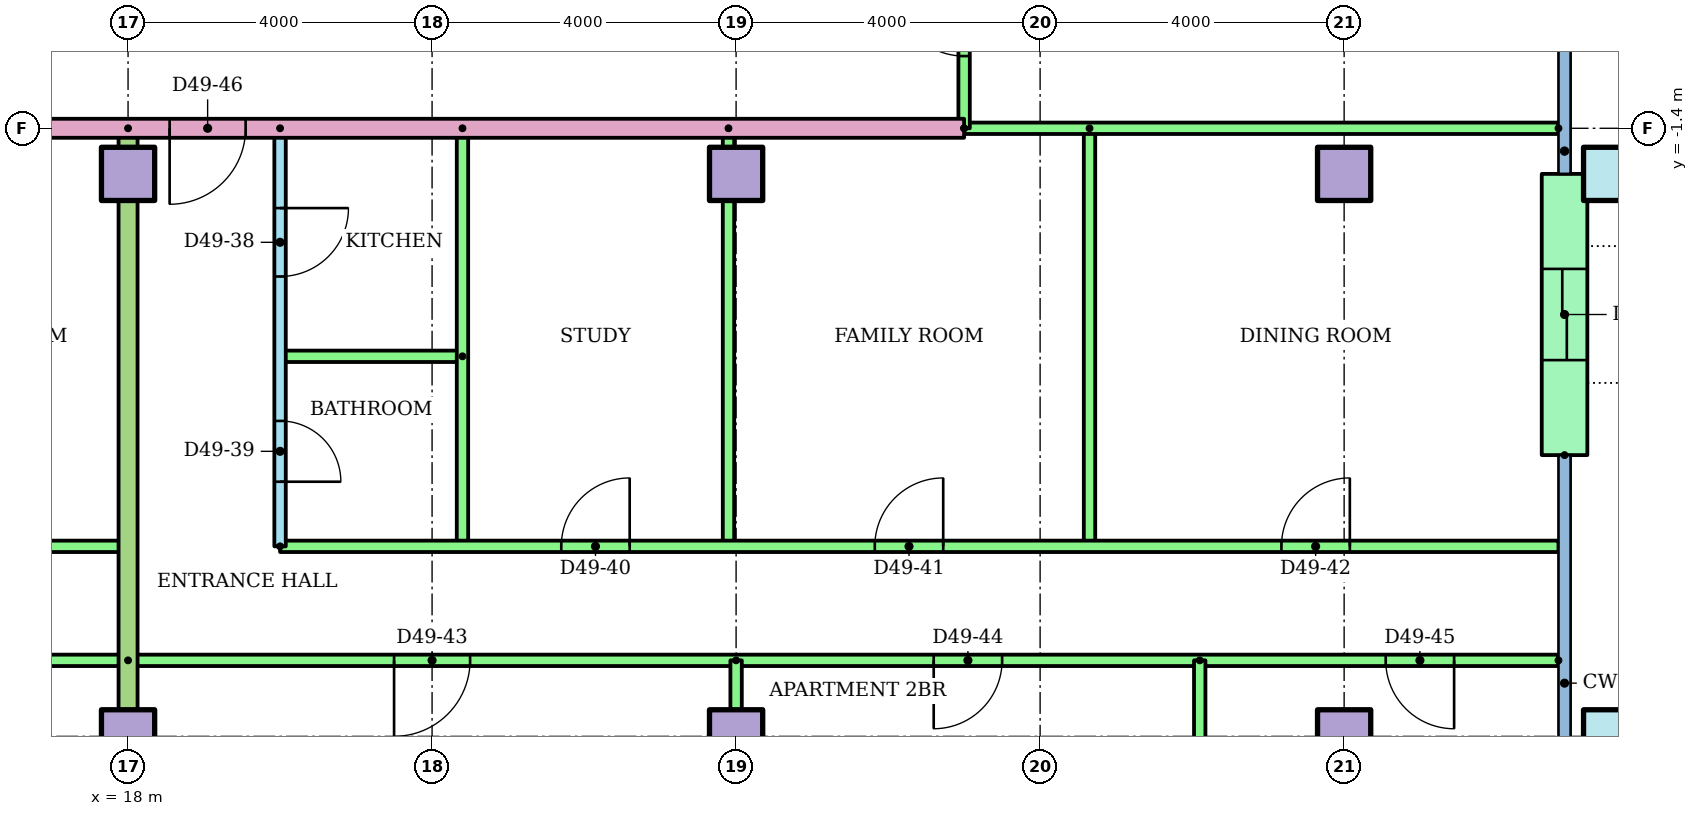
"""IFC4 building model, lengths in metres.
Left out: names, types, materials, properties, quantities, classifications, styles, units other than length and angle.
Written with IfcOpenShell. Run it as: python <this file> out.ifc"""

import sys

from ifc_helpers import new_model, si_unit, direction, frame, frame_2d, origin, origin_2d, place, context, subcontext, project, spatial, rectangle, hollow_rectangle, extrude, element, fill, save


model = new_model("IFC4")
c1 = context("Model", 3, precision=1e-05, world=origin(), true_north=direction((0.0, 1.0)))
c2 = subcontext(c1, "Body", "Model", "MODEL_VIEW")
j1 = project(units=[si_unit("LENGTHUNIT", "METRE"), si_unit("PLANEANGLEUNIT", "RADIAN")], contexts=[c1])
p1 = place(None, origin())
s1 = spatial("IfcSite", under=j1, at=p1, CompositionType="ELEMENT")
p2 = place(p1, origin())
s2 = spatial("IfcBuilding", under=s1, at=p2, CompositionType="ELEMENT")
p3 = place(p2, frame((0.0, 0.0, 187.7)))
s3 = spatial("IfcBuildingStorey", under=s2, at=p3, CompositionType="ELEMENT", Elevation=187.7)
for number, where in (
    (1, (18.0, -9.4, 0.0)),
    (2, (26.0, -9.4, 0.0)),
    (3, (34.0, -9.4, 0.0)),
):
    element("IfcColumn", number, at=place(p3, frame(where)), inside=s3, PredefinedType="COLUMN", context=c2, shape_type="SweptSolid", body=[
        extrude(rectangle(XDim=0.7, YDim=0.7, at=origin_2d()), origin(), (0.0, 0.0, 1.0), 3.2),
    ])
p4 = place(p3, frame((37.5, -9.4, 0.0)))
e4 = element("IfcColumn", 4, at=p4, inside=s3, PredefinedType="COLUMN", context=c2, shape_type="SweptSolid", body=[
    extrude(hollow_rectangle(XDim=0.7, YDim=0.7, WallThickness=0.036, at=origin_2d()), origin(), (0.0, 0.0, 1.0), 3.2),
])
for number, where in (
    (5, (18.0, -2.0, 0.0)),
    (6, (26.0, -2.0, 0.0)),
    (7, (34.0, -2.0, 0.0)),
):
    element("IfcColumn", number, at=place(p3, frame(where)), inside=s3, PredefinedType="COLUMN", context=c2, shape_type="SweptSolid", body=[
        extrude(rectangle(XDim=0.7, YDim=0.7, at=origin_2d()), origin(), (0.0, 0.0, 1.0), 3.2),
    ])
p5 = place(p3, frame((37.5, -2.0, 0.0)))
e8 = element("IfcColumn", 8, at=p5, inside=s3, PredefinedType="COLUMN", context=c2, shape_type="SweptSolid", body=[
    extrude(hollow_rectangle(XDim=0.7, YDim=0.7, WallThickness=0.036, at=origin_2d()), origin(), (0.0, 0.0, 1.0), 3.2),
])
p6 = place(p3, frame((36.9, -5.7, 0.0), z_axis=(0.0, 0.0, 1.0), x_axis=(0.0, 1.0, 0.0)))
e9 = element("IfcWall", 9, at=p6, inside=s3, PredefinedType="STANDARD", context=c2, shape_type="SweptSolid", body=[
    extrude(rectangle(XDim=3.7, YDim=0.6, at=frame_2d((1.85, 0.0))), origin(), (0.0, 0.0, 1.0), 2.92),
])
p7 = place(p6, frame((1.25, 0.0, 0.0)))
e10 = element("IfcOpeningElement", 10, at=p7, cuts=e9, PredefinedType="OPENING", context=c2, shape_type="SweptSolid", body=[
    extrude(rectangle(XDim=1.2, YDim=2.1, at=frame_2d((0.6, 1.05))), frame((0.0, 0.31, 0.0), z_axis=(0.0, -1.0, 0.0), x_axis=(1.0, 0.0, 0.0)), (0.0, 0.0, 1.0), 0.62),
])
p8 = place(p3, frame((12.0, -6.9, 0.0)))
e11 = element("IfcWall", 11, at=p8, inside=s3, PredefinedType="PARTITIONING", context=c2, shape_type="SweptSolid", body=[
    extrude(rectangle(XDim=6.0, YDim=0.15, at=frame_2d((3.0, 0.0))), origin(), (0.0, 0.0, 1.0), 2.4),
])
p9 = place(p8, frame((3.75, 0.0, 0.0)))
e12 = element("IfcOpeningElement", 12, at=p9, cuts=e11, PredefinedType="OPENING", context=c2, shape_type="SweptSolid", body=[
    extrude(rectangle(XDim=0.9, YDim=2.1, at=frame_2d((0.45, 1.05))), frame((0.0, 0.085, 0.0), z_axis=(0.0, -1.0, 0.0), x_axis=(1.0, 0.0, 0.0)), (0.0, 0.0, 1.0), 0.17),
])
p10 = place(p3, frame((18.0, -8.4, 0.0), z_axis=(0.0, 0.0, 1.0), x_axis=(-1.0, 0.0, 0.0)))
e13 = element("IfcWall", 13, at=p10, inside=s3, PredefinedType="PARTITIONING", context=c2, shape_type="SweptSolid", body=[
    extrude(rectangle(XDim=8.0, YDim=0.15, at=frame_2d((4.0, 0.0))), origin(), (0.0, 0.0, 1.0), 2.4),
])
p11 = place(p10, frame((5.5, 0.0, 0.0)))
e14 = element("IfcOpeningElement", 14, at=p11, cuts=e13, PredefinedType="OPENING", context=c2, shape_type="SweptSolid", body=[
    extrude(rectangle(XDim=1.0, YDim=2.1, at=frame_2d((0.5, 1.05))), frame((0.0, 0.085, 0.0), z_axis=(0.0, -1.0, 0.0), x_axis=(1.0, 0.0, 0.0)), (0.0, 0.0, 1.0), 0.17),
])
p12 = place(p10, frame((1.5, 0.0, 0.0)))
e15 = element("IfcOpeningElement", 15, at=p12, cuts=e13, PredefinedType="OPENING", context=c2, shape_type="SweptSolid", body=[
    extrude(rectangle(XDim=1.0, YDim=2.1, at=frame_2d((0.5, 1.05))), frame((0.0, 0.085, 0.0), z_axis=(0.0, -1.0, 0.0), x_axis=(1.0, 0.0, 0.0)), (0.0, 0.0, 1.0), 0.17),
])
p13 = place(p3, frame((20.0, -1.4, 0.0), z_axis=(0.0, 0.0, 1.0), x_axis=(0.0, -1.0, 0.0)))
e16 = element("IfcWall", 16, at=p13, inside=s3, PredefinedType="PARTITIONING", context=c2, shape_type="SweptSolid", body=[
    extrude(rectangle(XDim=5.5, YDim=0.15, at=frame_2d((2.75, 0.0))), origin(), (0.0, 0.0, 1.0), 2.4),
])
p14 = place(p13, frame((1.05, 0.0, 0.0)))
e17 = element("IfcOpeningElement", 17, at=p14, cuts=e16, PredefinedType="OPENING", context=c2, shape_type="SweptSolid", body=[
    extrude(rectangle(XDim=0.9, YDim=2.1, at=frame_2d((0.45, 1.05))), frame((0.0, 0.085, 0.0), z_axis=(0.0, -1.0, 0.0), x_axis=(1.0, 0.0, 0.0)), (0.0, 0.0, 1.0), 0.17),
])
p15 = place(p13, frame((3.85, 0.0, 0.0)))
e18 = element("IfcOpeningElement", 18, at=p15, cuts=e16, PredefinedType="OPENING", context=c2, shape_type="SweptSolid", body=[
    extrude(rectangle(XDim=0.8, YDim=2.1, at=frame_2d((0.4, 1.05))), frame((0.0, 0.085, 0.0), z_axis=(0.0, -1.0, 0.0), x_axis=(1.0, 0.0, 0.0)), (0.0, 0.0, 1.0), 0.17),
])
p16 = place(p3, frame((22.4, -4.4, 0.0), z_axis=(0.0, 0.0, 1.0), x_axis=(-1.0, 0.0, 0.0)))
e19 = element("IfcWall", 19, at=p16, inside=s3, PredefinedType="PARTITIONING", context=c2, shape_type="SweptSolid", body=[
    extrude(rectangle(XDim=2.4, YDim=0.15, at=frame_2d((1.2, 0.0))), origin(), (0.0, 0.0, 1.0), 2.4),
])
for number, where, z_axis, x_axis in (
    (20, (22.4, -1.4, 0.0), (0.0, 0.0, 1.0), (0.0, -1.0, 0.0)),
    (21, (25.9, -1.4, 0.0), (0.0, 0.0, 1.0), (0.0, -1.0, 0.0)),
    (22, (30.65, -1.4, 0.0), (0.0, 0.0, 1.0), (0.0, -1.0, 0.0)),
):
    element("IfcWall", number, at=place(p3, frame(where, z_axis=z_axis, x_axis=x_axis)), inside=s3, PredefinedType="PARTITIONING", context=c2, shape_type="SweptSolid", body=[
        extrude(rectangle(XDim=5.5, YDim=0.15, at=frame_2d((2.75, 0.0))), origin(), (0.0, 0.0, 1.0), 2.4),
    ])
p17 = place(p3, frame((20.0, -6.9, 0.0)))
e23 = element("IfcWall", 23, at=p17, inside=s3, PredefinedType="PARTITIONING", context=c2, shape_type="SweptSolid", body=[
    extrude(rectangle(XDim=16.82, YDim=0.15, at=frame_2d((8.41, 0.0))), origin(), (0.0, 0.0, 1.0), 2.4),
])
p18 = place(p17, frame((3.7, 0.0, 0.0)))
e24 = element("IfcOpeningElement", 24, at=p18, cuts=e23, PredefinedType="OPENING", context=c2, shape_type="SweptSolid", body=[
    extrude(rectangle(XDim=0.9, YDim=2.1, at=frame_2d((0.45, 1.05))), frame((0.0, 0.085, 0.0), z_axis=(0.0, -1.0, 0.0), x_axis=(1.0, 0.0, 0.0)), (0.0, 0.0, 1.0), 0.17),
])
p19 = place(p17, frame((7.825, 0.0, 0.0)))
e25 = element("IfcOpeningElement", 25, at=p19, cuts=e23, PredefinedType="OPENING", context=c2, shape_type="SweptSolid", body=[
    extrude(rectangle(XDim=0.9, YDim=2.1, at=frame_2d((0.45, 1.05))), frame((0.0, 0.085, 0.0), z_axis=(0.0, -1.0, 0.0), x_axis=(1.0, 0.0, 0.0)), (0.0, 0.0, 1.0), 0.17),
])
p20 = place(p17, frame((13.175, 0.0, 0.0)))
e26 = element("IfcOpeningElement", 26, at=p20, cuts=e23, PredefinedType="OPENING", context=c2, shape_type="SweptSolid", body=[
    extrude(rectangle(XDim=0.9, YDim=2.1, at=frame_2d((0.45, 1.05))), frame((0.0, 0.085, 0.0), z_axis=(0.0, -1.0, 0.0), x_axis=(1.0, 0.0, 0.0)), (0.0, 0.0, 1.0), 0.17),
])
p21 = place(p3, frame((36.82, -8.4, 0.0), z_axis=(0.0, 0.0, 1.0), x_axis=(-1.0, 0.0, 0.0)))
e27 = element("IfcWall", 27, at=p21, inside=s3, PredefinedType="PARTITIONING", context=c2, shape_type="SweptSolid", body=[
    extrude(rectangle(XDim=18.82, YDim=0.15, at=frame_2d((9.41, 0.0))), origin(), (0.0, 0.0, 1.0), 2.4),
])
p22 = place(p21, frame((14.32, 0.0, 0.0)))
e28 = element("IfcOpeningElement", 28, at=p22, cuts=e27, PredefinedType="OPENING", context=c2, shape_type="SweptSolid", body=[
    extrude(rectangle(XDim=1.0, YDim=2.1, at=frame_2d((0.5, 1.05))), frame((0.0, 0.085, 0.0), z_axis=(0.0, -1.0, 0.0), x_axis=(1.0, 0.0, 0.0)), (0.0, 0.0, 1.0), 0.17),
])
p23 = place(p21, frame((7.32, 0.0, 0.0)))
e29 = element("IfcOpeningElement", 29, at=p23, cuts=e27, PredefinedType="OPENING", context=c2, shape_type="SweptSolid", body=[
    extrude(rectangle(XDim=0.9, YDim=2.1, at=frame_2d((0.45, 1.05))), frame((0.0, 0.085, 0.0), z_axis=(0.0, -1.0, 0.0), x_axis=(1.0, 0.0, 0.0)), (0.0, 0.0, 1.0), 0.17),
])
p24 = place(p21, frame((1.373, 0.0, 0.0)))
e30 = element("IfcOpeningElement", 30, at=p24, cuts=e27, PredefinedType="OPENING", context=c2, shape_type="SweptSolid", body=[
    extrude(rectangle(XDim=0.9, YDim=2.1, at=frame_2d((0.45, 1.05))), frame((0.0, 0.085, 0.0), z_axis=(0.0, -1.0, 0.0), x_axis=(1.0, 0.0, 0.0)), (0.0, 0.0, 1.0), 0.17),
])
p25 = place(p3, frame((26.0, -8.4, 0.0), z_axis=(0.0, 0.0, 1.0), x_axis=(0.0, -1.0, 0.0)))
e31 = element("IfcWall", 31, at=p25, inside=s3, PredefinedType="PARTITIONING", context=c2, shape_type="SweptSolid", body=[
    extrude(rectangle(XDim=8.01, YDim=0.15, at=frame_2d((4.005, 0.0))), origin(), (0.0, 0.0, 1.0), 2.4),
])
p26 = place(p3, frame((32.1, -8.4, 0.0), z_axis=(0.0, 0.0, 1.0), x_axis=(0.0, -1.0, 0.0)))
e32 = element("IfcWall", 32, at=p26, inside=s3, PredefinedType="PARTITIONING", context=c2, shape_type="SweptSolid", body=[
    extrude(rectangle(XDim=6.22, YDim=0.15, at=frame_2d((3.11, 0.0))), origin(), (0.0, 0.0, 1.0), 2.4),
])
p27 = place(p3, frame((18.0, -1.4, 0.0), z_axis=(0.0, 0.0, 1.0), x_axis=(0.0, -1.0, 0.0)))
e33 = element("IfcWall", 33, at=p27, inside=s3, PredefinedType="PARTITIONING", context=c2, shape_type="SweptSolid", body=[
    extrude(rectangle(XDim=15.01, YDim=0.25, at=frame_2d((7.505, 0.0))), origin(), (0.0, 0.0, 1.0), 2.4),
])
p28 = place(p3, frame((29.0, -1.4, 0.0), z_axis=(0.0, 0.0, 1.0), x_axis=(-1.0, 0.0, 0.0)))
e34 = element("IfcWall", 34, at=p28, inside=s3, PredefinedType="PARTITIONING", context=c2, shape_type="SweptSolid", body=[
    extrude(rectangle(XDim=15.0, YDim=0.25, at=frame_2d((7.5, 0.0))), origin(), (0.0, 0.0, 1.0), 2.4),
])
p29 = place(p28, frame((9.453, 0.0, 0.0)))
e35 = element("IfcOpeningElement", 35, at=p29, cuts=e34, PredefinedType="OPENING", context=c2, shape_type="SweptSolid", body=[
    extrude(rectangle(XDim=1.0, YDim=2.1, at=frame_2d((0.5, 1.05))), frame((0.0, 0.135, 0.0), z_axis=(0.0, -1.0, 0.0), x_axis=(1.0, 0.0, 0.0)), (0.0, 0.0, 1.0), 0.27),
])
p30 = place(p3, frame((36.82, -1.4, 0.0), z_axis=(0.0, 0.0, 1.0), x_axis=(-1.0, 0.0, 0.0)))
e36 = element("IfcWall", 36, at=p30, inside=s3, PredefinedType="PARTITIONING", context=c2, shape_type="SweptSolid", body=[
    extrude(rectangle(XDim=7.82, YDim=0.15, at=frame_2d((3.91, 0.0))), origin(), (0.0, 0.0, 1.0), 2.4),
])
p31 = place(p3, frame((29.0, -1.4, 0.0), z_axis=(0.0, 0.0, 1.0), x_axis=(0.0, 1.0, 0.0)))
e37 = element("IfcWall", 37, at=p31, inside=s3, PredefinedType="PARTITIONING", context=c2, shape_type="SweptSolid", body=[
    extrude(rectangle(XDim=2.8, YDim=0.15, at=frame_2d((1.4, 0.0))), origin(), (0.0, 0.0, 1.0), 2.4),
])
p32 = place(p31, frame((0.95, 0.0, 0.0)))
e38 = element("IfcOpeningElement", 38, at=p32, cuts=e37, PredefinedType="OPENING", context=c2, shape_type="SweptSolid", body=[
    extrude(rectangle(XDim=0.9, YDim=2.1, at=frame_2d((0.45, 1.05))), frame((0.0, 0.085, 0.0), z_axis=(0.0, -1.0, 0.0), x_axis=(1.0, 0.0, 0.0)), (0.0, 0.0, 1.0), 0.17),
])
p33 = place(p14, origin())
e39 = element("IfcDoor", 39, at=p33, inside=s3, OperationType="SINGLE_SWING_LEFT", PredefinedType="DOOR", context=c2, shape_type="SweptSolid", body=[
    extrude(rectangle(XDim=0.9, YDim=2.1, at=frame_2d((0.45, 1.05))), frame((0.0, 0.025, 0.0), z_axis=(0.0, -1.0, 0.0), x_axis=(1.0, 0.0, 0.0)), (0.0, 0.0, 1.0), 0.05),
])
fill(e17, e39)
p34 = place(p15, origin())
e40 = element("IfcDoor", 40, at=p34, inside=s3, OperationType="SINGLE_SWING_RIGHT", PredefinedType="DOOR", context=c2, shape_type="SweptSolid", body=[
    extrude(rectangle(XDim=0.8, YDim=2.1, at=frame_2d((0.4, 1.05))), frame((0.0, 0.025, 0.0), z_axis=(0.0, -1.0, 0.0), x_axis=(1.0, 0.0, 0.0)), (0.0, 0.0, 1.0), 0.05),
])
fill(e18, e40)
p35 = place(p18, origin())
e41 = element("IfcDoor", 41, at=p35, inside=s3, OperationType="SINGLE_SWING_RIGHT", PredefinedType="DOOR", context=c2, shape_type="SweptSolid", body=[
    extrude(rectangle(XDim=0.9, YDim=2.1, at=frame_2d((0.45, 1.05))), frame((0.0, 0.025, 0.0), z_axis=(0.0, -1.0, 0.0), x_axis=(1.0, 0.0, 0.0)), (0.0, 0.0, 1.0), 0.05),
])
fill(e24, e41)
p36 = place(p19, origin())
e42 = element("IfcDoor", 42, at=p36, inside=s3, OperationType="SINGLE_SWING_RIGHT", PredefinedType="DOOR", context=c2, shape_type="SweptSolid", body=[
    extrude(rectangle(XDim=0.9, YDim=2.1, at=frame_2d((0.45, 1.05))), frame((0.0, 0.025, 0.0), z_axis=(0.0, -1.0, 0.0), x_axis=(1.0, 0.0, 0.0)), (0.0, 0.0, 1.0), 0.05),
])
fill(e25, e42)
p37 = place(p20, origin())
e43 = element("IfcDoor", 43, at=p37, inside=s3, OperationType="SINGLE_SWING_RIGHT", PredefinedType="DOOR", context=c2, shape_type="SweptSolid", body=[
    extrude(rectangle(XDim=0.9, YDim=2.1, at=frame_2d((0.45, 1.05))), frame((0.0, 0.025, 0.0), z_axis=(0.0, -1.0, 0.0), x_axis=(1.0, 0.0, 0.0)), (0.0, 0.0, 1.0), 0.05),
])
fill(e26, e43)
p38 = place(p22, origin())
e44 = element("IfcDoor", 44, at=p38, inside=s3, OperationType="SINGLE_SWING_RIGHT", PredefinedType="DOOR", context=c2, shape_type="SweptSolid", body=[
    extrude(rectangle(XDim=1.0, YDim=2.1, at=frame_2d((0.5, 1.05))), frame((0.0, 0.025, 0.0), z_axis=(0.0, -1.0, 0.0), x_axis=(1.0, 0.0, 0.0)), (0.0, 0.0, 1.0), 0.05),
])
fill(e28, e44)
p39 = place(p23, origin())
e45 = element("IfcDoor", 45, at=p39, inside=s3, OperationType="SINGLE_SWING_RIGHT", PredefinedType="DOOR", context=c2, shape_type="SweptSolid", body=[
    extrude(rectangle(XDim=0.9, YDim=2.1, at=frame_2d((0.45, 1.05))), frame((0.0, 0.025, 0.0), z_axis=(0.0, -1.0, 0.0), x_axis=(1.0, 0.0, 0.0)), (0.0, 0.0, 1.0), 0.05),
])
fill(e29, e45)
p40 = place(p24, origin())
e46 = element("IfcDoor", 46, at=p40, inside=s3, OperationType="SINGLE_SWING_LEFT", PredefinedType="DOOR", context=c2, shape_type="SweptSolid", body=[
    extrude(rectangle(XDim=0.9, YDim=2.1, at=frame_2d((0.45, 1.05))), frame((0.0, 0.025, 0.0), z_axis=(0.0, -1.0, 0.0), x_axis=(1.0, 0.0, 0.0)), (0.0, 0.0, 1.0), 0.05),
])
fill(e30, e46)
p41 = place(p29, origin())
e47 = element("IfcDoor", 47, at=p41, inside=s3, OperationType="SINGLE_SWING_RIGHT", PredefinedType="DOOR", context=c2, shape_type="SweptSolid", body=[
    extrude(rectangle(XDim=1.0, YDim=2.1, at=frame_2d((0.5, 1.05))), frame((0.0, 0.025, 0.0), z_axis=(0.0, -1.0, 0.0), x_axis=(1.0, 0.0, 0.0)), (0.0, 0.0, 1.0), 0.05),
])
fill(e35, e47)
p42 = place(p32, origin())
e48 = element("IfcDoor", 48, at=p42, inside=s3, OperationType="SINGLE_SWING_RIGHT", PredefinedType="DOOR", context=c2, shape_type="SweptSolid", body=[
    extrude(rectangle(XDim=0.9, YDim=2.1, at=frame_2d((0.45, 1.05))), frame((0.0, 0.025, 0.0), z_axis=(0.0, -1.0, 0.0), x_axis=(1.0, 0.0, 0.0)), (0.0, 0.0, 1.0), 0.05),
])
fill(e38, e48)
p43 = place(p7, origin())
e49 = element("IfcDoor", 49, at=p43, inside=s3, OperationType="SLIDING_TO_LEFT", PredefinedType="DOOR", context=c2, shape_type="SweptSolid", body=[
    extrude(rectangle(XDim=1.2, YDim=2.1, at=frame_2d((0.6, 1.05))), frame((0.0, 0.025, 0.0), z_axis=(0.0, -1.0, 0.0), x_axis=(1.0, 0.0, 0.0)), (0.0, 0.0, 1.0), 0.05),
])
fill(e10, e49)
save(model, sys.argv[1])
